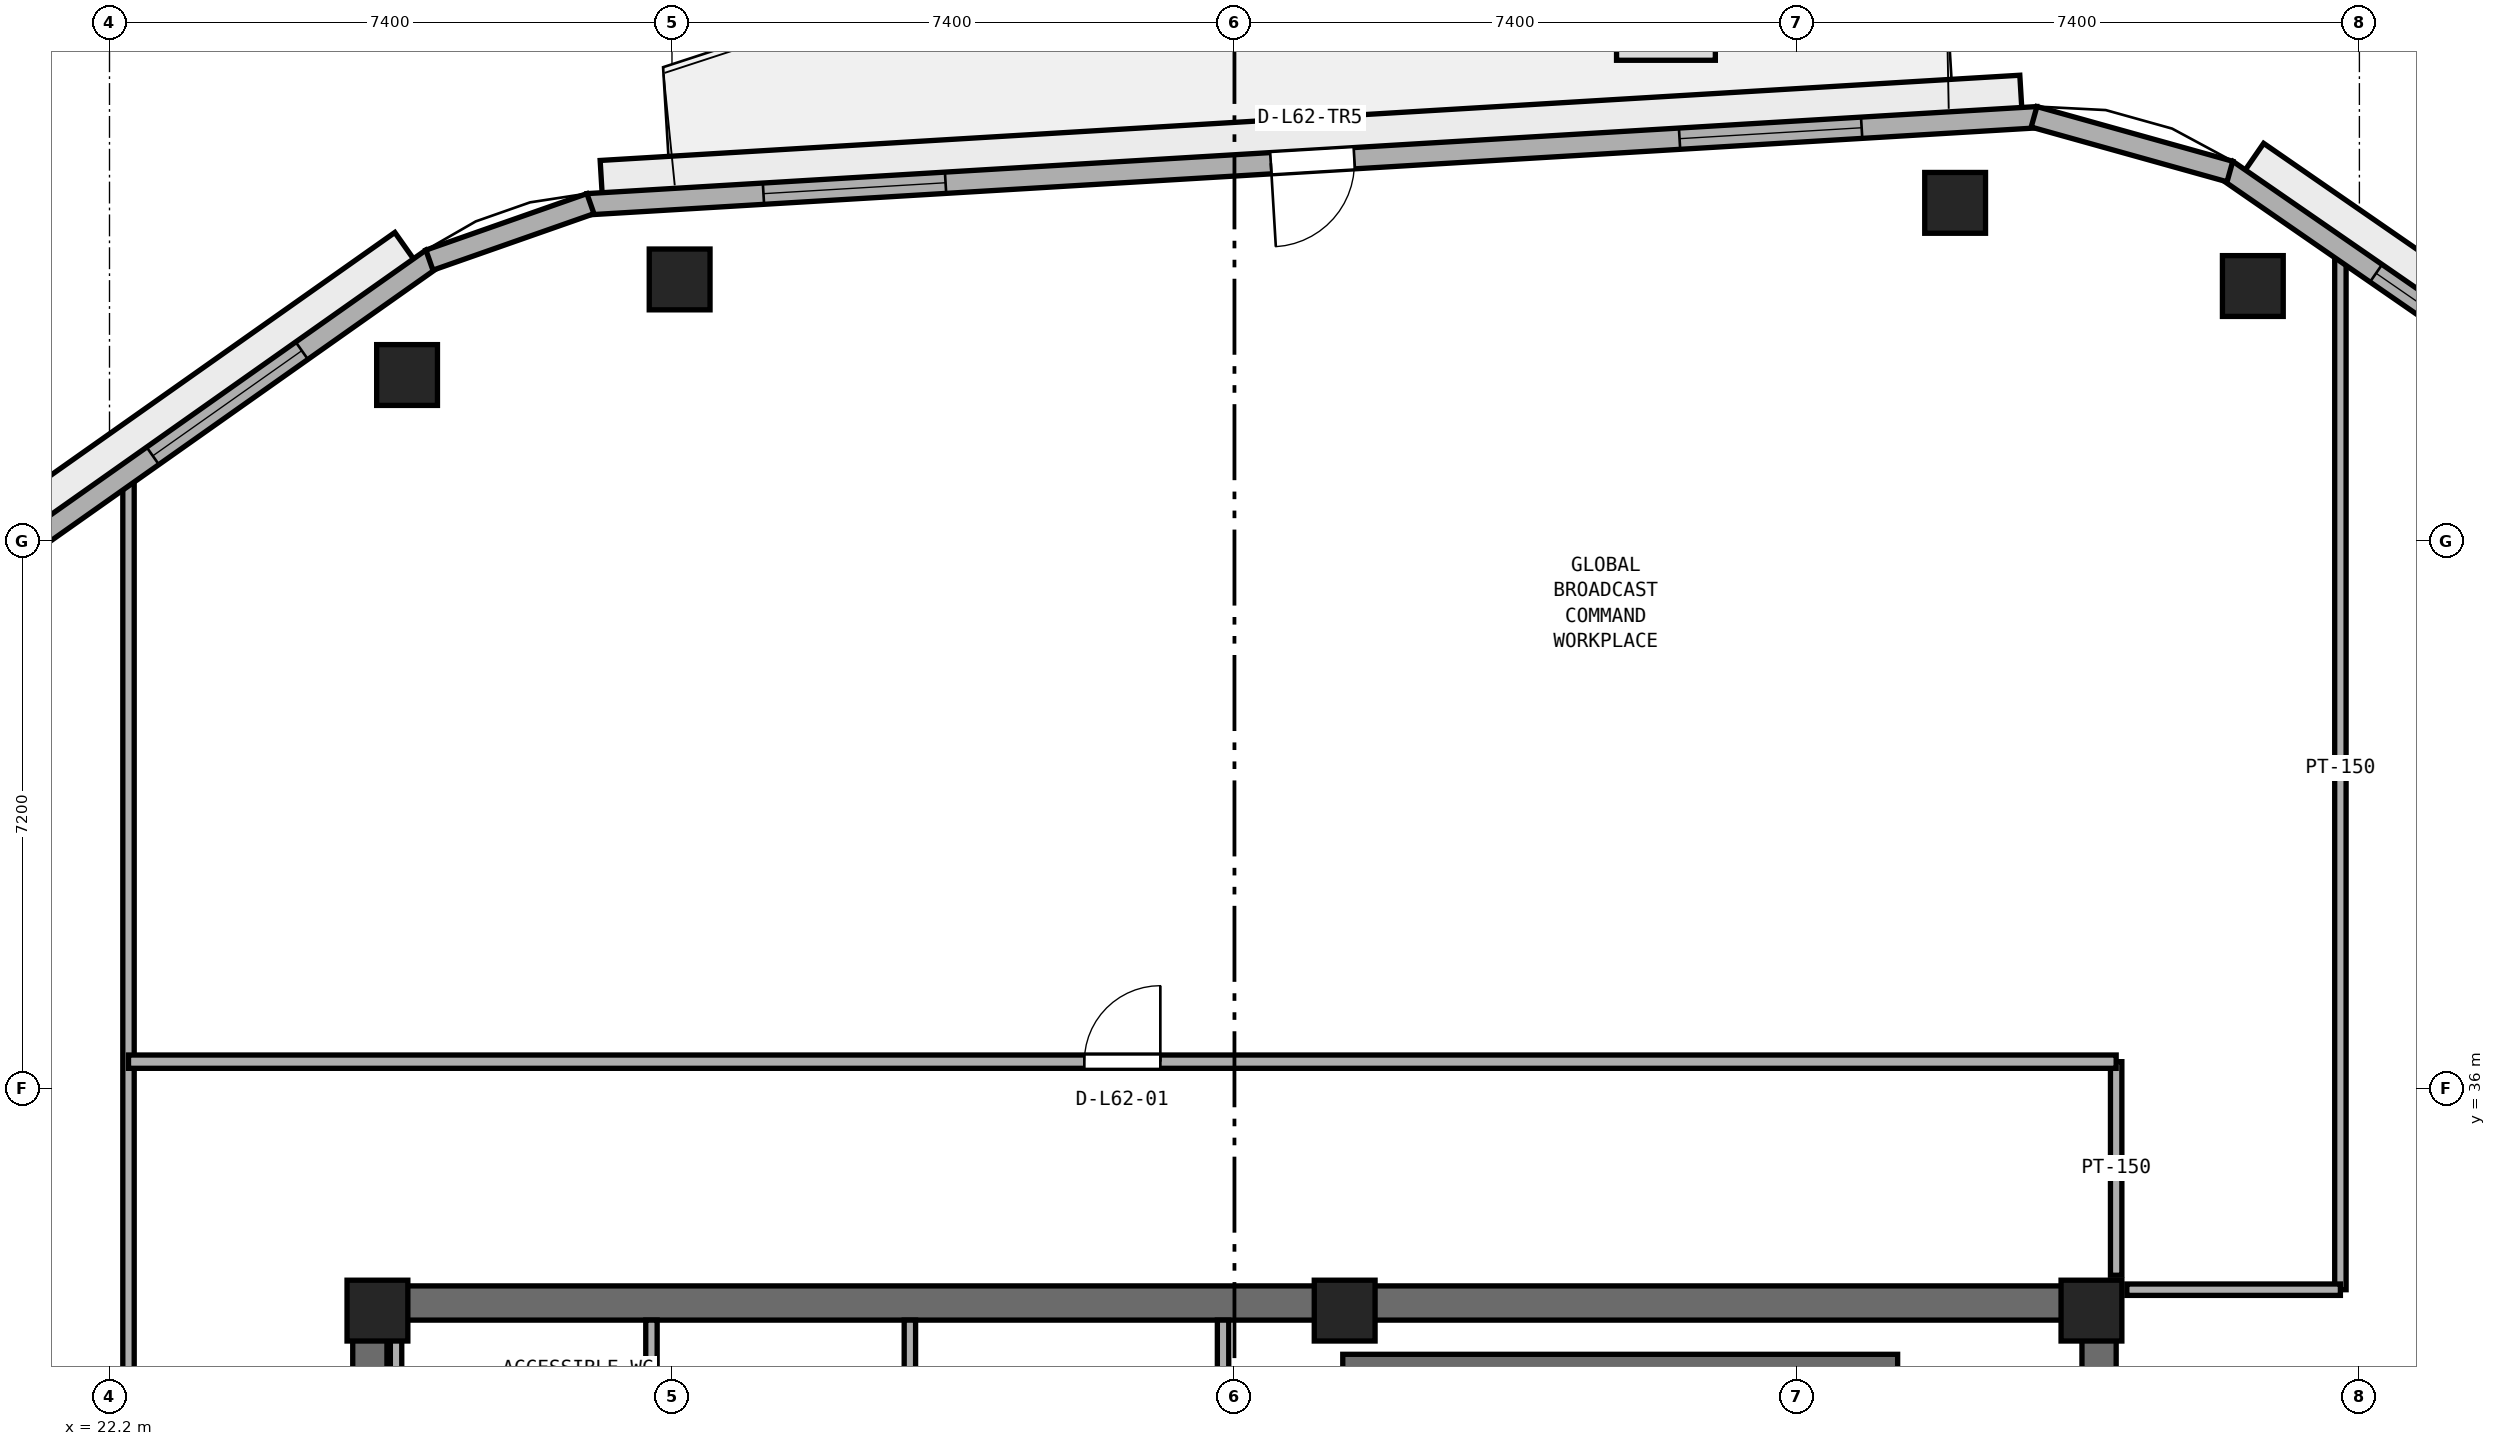
"""IFC4 building model, lengths in metres.
Left out: names, types, materials, properties, quantities, classifications, styles, units other than length and angle.
Written with IfcOpenShell. Run it as: python <this file> out.ifc"""

import sys

from ifc_helpers import new_model, si_unit, direction, frame, frame_2d, origin, origin_2d, place, context, subcontext, project, spatial, rectangle, extrude, element, fill, save


model = new_model("IFC4")
c1 = context("Model", 3, precision=1e-05, world=origin(), true_north=direction((0.0, 1.0)))
c2 = subcontext(c1, "Body", "Model", "MODEL_VIEW")
j1 = project(units=[si_unit("LENGTHUNIT", "METRE"), si_unit("PLANEANGLEUNIT", "RADIAN")], contexts=[c1])
p1 = place(None, origin())
s1 = spatial("IfcSite", under=j1, at=p1, CompositionType="ELEMENT")
p2 = place(p1, origin())
s2 = spatial("IfcBuilding", under=s1, at=p2, CompositionType="ELEMENT")
p3 = place(p2, frame((0.0, 0.0, 244.0)))
s3 = spatial("IfcBuildingStorey", under=s2, at=p3, CompositionType="ELEMENT", Elevation=244.0)
p4 = place(p3, frame((25.4, 33.175, 0.0), z_axis=(0.0, 0.0, 1.0), x_axis=(1.0, 0.0, 0.0)))
e1 = element("IfcWall", 1, at=p4, inside=s3, PredefinedType="SHEAR", context=c2, shape_type="SweptSolid", body=[
    extrude(rectangle(XDim=23.2, YDim=0.45, at=frame_2d((11.6, 0.0))), origin(), (0.0, 0.0, 1.0), 3.51),
])
p5 = place(p3, frame((25.625, 17.45, 0.0), z_axis=(0.0, 0.0, 1.0), x_axis=(0.0, 1.0, 0.0)))
e2 = element("IfcWall", 2, at=p5, inside=s3, PredefinedType="SHEAR", context=c2, shape_type="SweptSolid", body=[
    extrude(rectangle(XDim=15.5, YDim=0.45, at=frame_2d((7.75, 0.0))), origin(), (0.0, 0.0, 1.0), 3.51),
])
p6 = place(p5, frame((7.0, 0.0, 0.0)))
e3 = element("IfcOpeningElement", 3, at=p6, cuts=e2, PredefinedType="OPENING", context=c2, shape_type="SweptSolid", body=[
    extrude(rectangle(XDim=1.5, YDim=2.15, at=frame_2d((0.75, 1.075))), frame((0.0, 0.235, 0.0), z_axis=(0.0, -1.0, 0.0), x_axis=(1.0, 0.0, 0.0)), (0.0, 0.0, 1.0), 0.47),
])
p7 = place(p3, frame((48.375, 17.45, 0.0), z_axis=(0.0, 0.0, 1.0), x_axis=(0.0, 1.0, 0.0)))
e4 = element("IfcWall", 4, at=p7, inside=s3, PredefinedType="SHEAR", context=c2, shape_type="SweptSolid", body=[
    extrude(rectangle(XDim=15.5, YDim=0.45, at=frame_2d((7.75, 0.0))), origin(), (0.0, 0.0, 1.0), 3.51),
])
p8 = place(p7, frame((5.85, 0.0, 0.0)))
e5 = element("IfcOpeningElement", 5, at=p8, cuts=e4, PredefinedType="OPENING", context=c2, shape_type="SweptSolid", body=[
    extrude(rectangle(XDim=1.5, YDim=2.15, at=frame_2d((0.75, 1.075))), frame((0.0, 0.235, 0.0), z_axis=(0.0, -1.0, 0.0), x_axis=(1.0, 0.0, 0.0)), (0.0, 0.0, 1.0), 0.47),
])
for number, where, z_axis, x_axis in (
    (6, (48.275, 33.075, 0.0), (0.0, 0.0, 1.0), (1.0, 0.0, 0.0)),
    (7, (38.45, 33.075, 0.0), (0.0, 0.0, 1.0), (1.0, 0.0, 0.0)),
    (8, (25.725, 33.075, 0.0), (0.0, 0.0, 1.0), (1.0, 0.0, 0.0)),
):
    element("IfcColumn", number, at=place(p3, frame(where, z_axis=z_axis, x_axis=x_axis)), inside=s3, PredefinedType="PILASTER", context=c2, shape_type="SweptSolid", body=[
        extrude(rectangle(XDim=0.8, YDim=0.8, at=origin_2d()), origin(), (0.0, 0.0, 1.0), 3.8),
    ])
for number, where, z_axis, x_axis in (
    (9, (50.398, 46.554, 0.0), (0.0, 0.0, 1.0), (1.0, 0.0, 0.0)),
    (10, (46.481, 47.648, 0.0), (0.0, 0.0, 1.0), (1.0, 0.0, 0.0)),
    (11, (29.701, 46.641, 0.0), (0.0, 0.0, 1.0), (1.0, 0.0, 0.0)),
    (12, (26.115, 45.384, 0.0), (0.0, 0.0, 1.0), (1.0, 0.0, 0.0)),
):
    element("IfcColumn", number, at=place(p3, frame(where, z_axis=z_axis, x_axis=x_axis)), inside=s3, PredefinedType="COLUMN", context=c2, shape_type="SweptSolid", body=[
        extrude(rectangle(XDim=0.8, YDim=0.8, at=origin_2d()), origin(), (0.0, 0.0, 1.0), 3.8),
    ])
p9 = place(p3, frame((38.425, 32.375, 0.0), z_axis=(0.0, 0.0, 1.0), x_axis=(1.0, 0.0, 0.0)))
e13 = element("IfcWall", 13, at=p9, inside=s3, PredefinedType="SHEAR", context=c2, shape_type="SweptSolid", body=[
    extrude(rectangle(XDim=7.3, YDim=0.25, at=frame_2d((3.65, 0.0))), origin(), (0.0, 0.0, 1.0), 3.51),
])
p10 = place(p3, frame((25.97, 30.65, 0.0), z_axis=(0.0, 0.0, 1.0), x_axis=(0.0, 1.0, 0.0)))
e14 = element("IfcWall", 14, at=p10, inside=s3, PredefinedType="PARTITIONING", context=c2, shape_type="SweptSolid", body=[
    extrude(rectangle(XDim=2.3, YDim=0.15, at=frame_2d((1.15, 0.0))), origin(), (0.0, 0.0, 1.0), 2.61),
])
for number, where, z_axis, x_axis in (
    (15, (29.33, 30.65, 0.0), (0.0, 0.0, 1.0), (0.0, 1.0, 0.0)),
    (16, (32.73, 30.65, 0.0), (0.0, 0.0, 1.0), (0.0, 1.0, 0.0)),
    (17, (36.85, 30.65, 0.0), (0.0, 0.0, 1.0), (0.0, 1.0, 0.0)),
):
    element("IfcWall", number, at=place(p3, frame(where, z_axis=z_axis, x_axis=x_axis)), inside=s3, PredefinedType="PARTITIONING", context=c2, shape_type="SweptSolid", body=[
        extrude(rectangle(XDim=2.3, YDim=0.15, at=frame_2d((1.15, 0.0))), origin(), (0.0, 0.0, 1.0), 3.51),
    ])
p11 = place(p3, frame((51.55, 33.35, 0.0), z_axis=(0.0, 0.0, 1.0), x_axis=(0.0, 1.0, 0.0)))
e18 = element("IfcWall", 18, at=p11, inside=s3, PredefinedType="PARTITIONING", context=c2, shape_type="SweptSolid", body=[
    extrude(rectangle(XDim=13.727, YDim=0.15, at=frame_2d((6.863, 0.0))), origin(), (0.0, 0.0, 1.0), 3.51),
])
p12 = place(p3, frame((48.6, 33.54, 0.0), z_axis=(0.0, 0.0, 1.0), x_axis=(0.0, 1.0, 0.0)))
e19 = element("IfcWall", 19, at=p12, inside=s3, PredefinedType="PARTITIONING", context=c2, shape_type="SweptSolid", body=[
    extrude(rectangle(XDim=2.81, YDim=0.15, at=frame_2d((1.405, 0.0))), origin(), (0.0, 0.0, 1.0), 2.893),
])
p13 = place(p3, frame((22.45, 6.02, 0.0), z_axis=(0.0, 0.0, 1.0), x_axis=(0.0, 1.0, 0.0)))
e20 = element("IfcWall", 20, at=p13, inside=s3, PredefinedType="PARTITIONING", context=c2, shape_type="SweptSolid", body=[
    extrude(rectangle(XDim=38.106, YDim=0.15, at=frame_2d((19.053, 0.0))), origin(), (0.0, 0.0, 1.0), 3.51),
])
p14 = place(p13, frame((11.005, 0.0, 0.0)))
e21 = element("IfcOpeningElement", 21, at=p14, cuts=e20, PredefinedType="OPENING", context=c2, shape_type="SweptSolid", body=[
    extrude(rectangle(XDim=0.9, YDim=2.1, at=frame_2d((0.45, 1.05))), frame((0.0, 0.085, 0.0), z_axis=(0.0, -1.0, 0.0), x_axis=(1.0, 0.0, 0.0)), (0.0, 0.0, 1.0), 0.17),
])
p15 = place(p13, frame((22.155, 0.0, 0.0)))
e22 = element("IfcOpeningElement", 22, at=p15, cuts=e20, PredefinedType="OPENING", context=c2, shape_type="SweptSolid", body=[
    extrude(rectangle(XDim=0.9, YDim=2.1, at=frame_2d((0.45, 1.05))), frame((0.0, 0.085, 0.0), z_axis=(0.0, -1.0, 0.0), x_axis=(1.0, 0.0, 0.0)), (0.0, 0.0, 1.0), 0.17),
])
p16 = place(p3, frame((48.74, 33.35, 0.0), z_axis=(0.0, 0.0, 1.0), x_axis=(1.0, 0.0, 0.0)))
e23 = element("IfcWall", 23, at=p16, inside=s3, PredefinedType="PARTITIONING", context=c2, shape_type="SweptSolid", body=[
    extrude(rectangle(XDim=2.81, YDim=0.15, at=frame_2d((1.405, 0.0))), origin(), (0.0, 0.0, 1.0), 2.893),
])
p17 = place(p3, frame((22.45, 36.35, 0.0), z_axis=(0.0, 0.0, 1.0), x_axis=(1.0, 0.0, 0.0)))
e24 = element("IfcWall", 24, at=p17, inside=s3, PredefinedType="PARTITIONING", context=c2, shape_type="SweptSolid", body=[
    extrude(rectangle(XDim=26.15, YDim=0.175, at=frame_2d((13.075, 0.0))), origin(), (0.0, 0.0, 1.0), 3.51),
])
p18 = place(p17, frame((12.575, 0.0, 0.0)))
e25 = element("IfcOpeningElement", 25, at=p18, cuts=e24, PredefinedType="OPENING", context=c2, shape_type="SweptSolid", body=[
    extrude(rectangle(XDim=1.0, YDim=2.12, at=frame_2d((0.5, 1.06))), frame((0.0, 0.097, 0.0), z_axis=(0.0, -1.0, 0.0), x_axis=(1.0, 0.0, 0.0)), (0.0, 0.0, 1.0), 0.195),
])
p19 = place(p3, frame((63.651, 38.683, 0.0), z_axis=(0.0, 0.0, 1.0), x_axis=(-0.822655095, 0.568540759022, 0.0)))
e26 = element("IfcWall", 26, at=p19, inside=s3, PredefinedType="STANDARD", context=c2, shape_type="SweptSolid", body=[
    extrude(rectangle(XDim=16.528, YDim=0.28, at=frame_2d((8.264, 0.0))), origin(), (0.0, 0.0, 1.0), 3.51),
])
p20 = place(p19, frame((1.888, 0.0, 0.9)))
e27 = element("IfcOpeningElement", 27, at=p20, cuts=e26, PredefinedType="OPENING", context=c2, shape_type="SweptSolid", body=[
    extrude(rectangle(XDim=2.4, YDim=1.75, at=frame_2d((1.2, 0.875))), frame((0.0, 0.15, 0.0), z_axis=(0.0, -1.0, 0.0), x_axis=(1.0, 0.0, 0.0)), (0.0, 0.0, 1.0), 0.3),
])
p21 = place(p19, frame((7.064, 0.0, 0.9)))
e28 = element("IfcOpeningElement", 28, at=p21, cuts=e26, PredefinedType="OPENING", context=c2, shape_type="SweptSolid", body=[
    extrude(rectangle(XDim=2.4, YDim=1.75, at=frame_2d((1.2, 0.875))), frame((0.0, 0.15, 0.0), z_axis=(0.0, -1.0, 0.0), x_axis=(1.0, 0.0, 0.0)), (0.0, 0.0, 1.0), 0.3),
])
p22 = place(p19, frame((11.74, 0.0, 0.9)))
e29 = element("IfcOpeningElement", 29, at=p22, cuts=e26, PredefinedType="OPENING", context=c2, shape_type="SweptSolid", body=[
    extrude(rectangle(XDim=2.4, YDim=1.75, at=frame_2d((1.2, 0.875))), frame((0.0, 0.15, 0.0), z_axis=(0.0, -1.0, 0.0), x_axis=(1.0, 0.0, 0.0)), (0.0, 0.0, 1.0), 0.3),
])
p23 = place(p3, frame((47.566, 48.775, 0.0), z_axis=(0.0, 0.0, 1.0), x_axis=(-0.998202767485, -0.059926913695, 0.0)))
e30 = element("IfcWall", 30, at=p23, inside=s3, PredefinedType="STANDARD", context=c2, shape_type="SweptSolid", body=[
    extrude(rectangle(XDim=19.111, YDim=0.28, at=frame_2d((9.556, 0.0))), origin(), (0.0, 0.0, 1.0), 3.51),
])
p24 = place(p23, frame((9.005, 0.0, 0.0)))
e31 = element("IfcOpeningElement", 31, at=p24, cuts=e30, PredefinedType="OPENING", context=c2, shape_type="SweptSolid", body=[
    extrude(rectangle(XDim=1.1, YDim=2.2, at=frame_2d((0.55, 1.1))), frame((0.0, 0.15, 0.0), z_axis=(0.0, -1.0, 0.0), x_axis=(1.0, 0.0, 0.0)), (0.0, 0.0, 1.0), 0.3),
])
p25 = place(p23, frame((2.319, 0.0, 0.9)))
e32 = element("IfcOpeningElement", 32, at=p25, cuts=e30, PredefinedType="OPENING", context=c2, shape_type="SweptSolid", body=[
    extrude(rectangle(XDim=2.4, YDim=1.75, at=frame_2d((1.2, 0.875))), frame((0.0, 0.15, 0.0), z_axis=(0.0, -1.0, 0.0), x_axis=(1.0, 0.0, 0.0)), (0.0, 0.0, 1.0), 0.3),
])
p26 = place(p23, frame((14.392, 0.0, 0.9)))
e33 = element("IfcOpeningElement", 33, at=p26, cuts=e30, PredefinedType="OPENING", context=c2, shape_type="SweptSolid", body=[
    extrude(rectangle(XDim=2.4, YDim=1.75, at=frame_2d((1.2, 0.875))), frame((0.0, 0.15, 0.0), z_axis=(0.0, -1.0, 0.0), x_axis=(1.0, 0.0, 0.0)), (0.0, 0.0, 1.0), 0.3),
])
p27 = place(p3, frame((26.443, 46.913, 0.0), z_axis=(0.0, 0.0, 1.0), x_axis=(-0.817024179766, -0.576603407619, 0.0)))
e34 = element("IfcWall", 34, at=p27, inside=s3, PredefinedType="STANDARD", context=c2, shape_type="SweptSolid", body=[
    extrude(rectangle(XDim=17.78, YDim=0.28, at=frame_2d((8.89, 0.0))), origin(), (0.0, 0.0, 1.0), 3.51),
])
p28 = place(p27, frame((2.097, 0.0, 0.9)))
e35 = element("IfcOpeningElement", 35, at=p28, cuts=e34, PredefinedType="OPENING", context=c2, shape_type="SweptSolid", body=[
    extrude(rectangle(XDim=2.4, YDim=1.75, at=frame_2d((1.2, 0.875))), frame((0.0, 0.15, 0.0), z_axis=(0.0, -1.0, 0.0), x_axis=(1.0, 0.0, 0.0)), (0.0, 0.0, 1.0), 0.3),
])
p29 = place(p27, frame((7.69, 0.0, 0.9)))
e36 = element("IfcOpeningElement", 36, at=p29, cuts=e34, PredefinedType="OPENING", context=c2, shape_type="SweptSolid", body=[
    extrude(rectangle(XDim=2.4, YDim=1.75, at=frame_2d((1.2, 0.875))), frame((0.0, 0.15, 0.0), z_axis=(0.0, -1.0, 0.0), x_axis=(1.0, 0.0, 0.0)), (0.0, 0.0, 1.0), 0.3),
])
p30 = place(p27, frame((13.283, 0.0, 0.9)))
e37 = element("IfcOpeningElement", 37, at=p30, cuts=e34, PredefinedType="OPENING", context=c2, shape_type="SweptSolid", body=[
    extrude(rectangle(XDim=2.4, YDim=1.75, at=frame_2d((1.2, 0.875))), frame((0.0, 0.15, 0.0), z_axis=(0.0, -1.0, 0.0), x_axis=(1.0, 0.0, 0.0)), (0.0, 0.0, 1.0), 0.3),
])
p31 = place(p3, frame((50.096, 48.061, 0.0), z_axis=(0.0, 0.0, 1.0), x_axis=(-0.963108887091, 0.269112005688, 0.0)))
e38 = element("IfcWall", 38, at=p31, inside=s3, PredefinedType="STANDARD", context=c2, shape_type="SweptSolid", body=[
    extrude(rectangle(XDim=2.675, YDim=0.28, at=frame_2d((1.338, 0.0))), origin(), (0.0, 0.0, 1.0), 3.51),
])
p32 = place(p3, frame((28.527, 47.638, 0.0), z_axis=(0.0, 0.0, 1.0), x_axis=(-0.943686979207, -0.330839667022, 0.0)))
e39 = element("IfcWall", 39, at=p32, inside=s3, PredefinedType="STANDARD", context=c2, shape_type="SweptSolid", body=[
    extrude(rectangle(XDim=2.245, YDim=0.28, at=frame_2d((1.123, 0.0))), origin(), (0.0, 0.0, 1.0), 3.51),
])
p33 = place(p18, origin())
e40 = element("IfcDoor", 40, at=p33, inside=s3, OperationType="SINGLE_SWING_RIGHT", PredefinedType="DOOR", context=c2, shape_type="SweptSolid", body=[
    extrude(rectangle(XDim=1.0, YDim=2.12, at=frame_2d((0.5, 1.06))), frame((0.0, 0.025, 0.0), z_axis=(0.0, -1.0, 0.0), x_axis=(1.0, 0.0, 0.0)), (0.0, 0.0, 1.0), 0.05),
])
fill(e25, e40)
p34 = place(p22, origin())
e41 = element("IfcWindow", 41, at=p34, inside=s3, PartitioningType="SINGLE_PANEL", PredefinedType="WINDOW", context=c2, shape_type="SweptSolid", body=[
    extrude(rectangle(XDim=2.4, YDim=1.75, at=frame_2d((1.2, 0.875))), frame((0.0, 0.03, 0.0), z_axis=(0.0, -1.0, 0.0), x_axis=(1.0, 0.0, 0.0)), (0.0, 0.0, 1.0), 0.06),
])
fill(e29, e41)
p35 = place(p24, origin())
e42 = element("IfcDoor", 42, at=p35, inside=s3, OperationType="SINGLE_SWING_RIGHT", PredefinedType="DOOR", context=c2, shape_type="SweptSolid", body=[
    extrude(rectangle(XDim=1.1, YDim=2.2, at=frame_2d((0.55, 1.1))), frame((0.0, 0.025, 0.0), z_axis=(0.0, -1.0, 0.0), x_axis=(1.0, 0.0, 0.0)), (0.0, 0.0, 1.0), 0.05),
])
fill(e31, e42)
p36 = place(p25, origin())
e43 = element("IfcWindow", 43, at=p36, inside=s3, PartitioningType="SINGLE_PANEL", PredefinedType="WINDOW", context=c2, shape_type="SweptSolid", body=[
    extrude(rectangle(XDim=2.4, YDim=1.75, at=frame_2d((1.2, 0.875))), frame((0.0, 0.03, 0.0), z_axis=(0.0, -1.0, 0.0), x_axis=(1.0, 0.0, 0.0)), (0.0, 0.0, 1.0), 0.06),
])
fill(e32, e43)
p37 = place(p26, origin())
e44 = element("IfcWindow", 44, at=p37, inside=s3, PartitioningType="SINGLE_PANEL", PredefinedType="WINDOW", context=c2, shape_type="SweptSolid", body=[
    extrude(rectangle(XDim=2.4, YDim=1.75, at=frame_2d((1.2, 0.875))), frame((0.0, 0.03, 0.0), z_axis=(0.0, -1.0, 0.0), x_axis=(1.0, 0.0, 0.0)), (0.0, 0.0, 1.0), 0.06),
])
fill(e33, e44)
p38 = place(p28, origin())
e45 = element("IfcWindow", 45, at=p38, inside=s3, PartitioningType="SINGLE_PANEL", PredefinedType="WINDOW", context=c2, shape_type="SweptSolid", body=[
    extrude(rectangle(XDim=2.4, YDim=1.75, at=frame_2d((1.2, 0.875))), frame((0.0, 0.03, 0.0), z_axis=(0.0, -1.0, 0.0), x_axis=(1.0, 0.0, 0.0)), (0.0, 0.0, 1.0), 0.06),
])
fill(e35, e45)
save(model, sys.argv[1])
